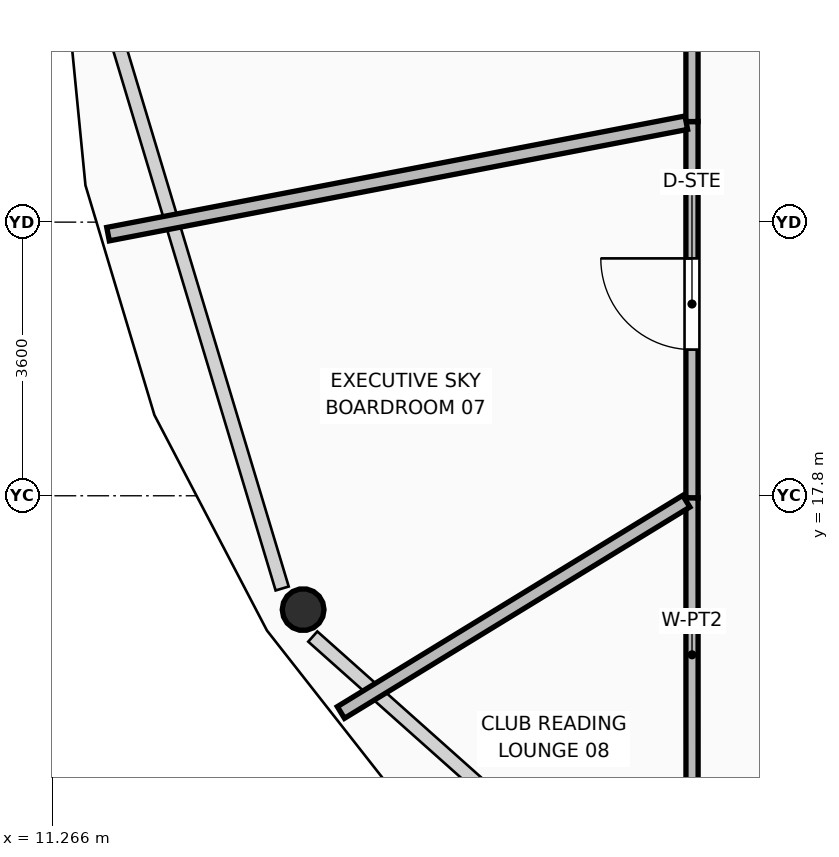
"""IFC4 building model, lengths in metres.
Left out: names, types, materials, properties, quantities, classifications, styles, units other than length and angle.
Written with IfcOpenShell. Run it as: python <this file> out.ifc"""

import sys

from ifc_helpers import new_model, si_unit, direction, frame, frame_2d, origin, origin_2d, place, context, subcontext, project, spatial, rectangle, hollow_circle, extrude, element, fill, save


model = new_model("IFC4")
c1 = context("Model", 3, precision=1e-05, world=origin(), true_north=direction((0.0, 1.0)))
c2 = subcontext(c1, "Body", "Model", "MODEL_VIEW")
j1 = project(units=[si_unit("LENGTHUNIT", "METRE"), si_unit("PLANEANGLEUNIT", "RADIAN")], contexts=[c1])
p1 = place(None, origin())
s1 = spatial("IfcSite", under=j1, at=p1, CompositionType="ELEMENT")
p2 = place(p1, origin())
s2 = spatial("IfcBuilding", under=s1, at=p2, CompositionType="ELEMENT")
p3 = place(p2, frame((0.0, 0.0, 278.85)))
s3 = spatial("IfcBuildingStorey", under=s2, at=p3, CompositionType="ELEMENT", Elevation=278.85)
p4 = place(p3, frame((14.569, 16.302, 0.0), z_axis=(0.185218066702, 0.09531807333, 0.978063767177), x_axis=(-0.457587432232, 0.889164631474, 0.0)))
e1 = element("IfcColumn", 1, at=p4, inside=s3, PredefinedType="COLUMN", context=c2, shape_type="SweptSolid", body=[
    extrude(hollow_circle(Radius=0.275, WallThickness=0.025, at=origin_2d()), origin(), (0.0, 0.0, 1.0), 3.65),
])
p5 = place(p3, frame((19.686, 13.642, 0.0), z_axis=(0.0, 0.0, 1.0), x_axis=(-0.000236350738, 0.999999972069, 0.0)))
e2 = element("IfcWall", 2, at=p5, inside=s3, PredefinedType="PARTITIONING", context=c2, shape_type="SweptSolid", body=[
    extrude(rectangle(XDim=4.132, YDim=0.16, at=frame_2d((2.066, 0.0))), origin(), (0.0, 0.0, 1.0), 3.132),
])
p6 = place(p3, frame((19.685, 17.774, 0.0), z_axis=(0.0, 0.0, 1.0), x_axis=(0.0, 1.0, 0.0)))
e3 = element("IfcWall", 3, at=p6, inside=s3, PredefinedType="PARTITIONING", context=c2, shape_type="SweptSolid", body=[
    extrude(rectangle(XDim=4.949, YDim=0.16, at=frame_2d((2.475, 0.0))), origin(), (0.0, 0.0, 1.0), 3.132),
])
p7 = place(p6, frame((1.949, 0.0, 0.0)))
e4 = element("IfcOpeningElement", 4, at=p7, cuts=e3, PredefinedType="OPENING", context=c2, shape_type="SweptSolid", body=[
    extrude(rectangle(XDim=1.2, YDim=2.1, at=frame_2d((0.6, 1.05))), frame((0.0, 0.09, 0.0), z_axis=(0.0, -1.0, 0.0), x_axis=(1.0, 0.0, 0.0)), (0.0, 0.0, 1.0), 0.18),
])
p8 = place(p3, frame((19.685, 22.723, 0.0), z_axis=(0.0, 0.0, 1.0), x_axis=(0.0, 1.0, 0.0)))
e5 = element("IfcWall", 5, at=p8, inside=s3, PredefinedType="PARTITIONING", context=c2, shape_type="SweptSolid", body=[
    extrude(rectangle(XDim=1.127, YDim=0.16, at=frame_2d((0.563, 0.0))), origin(), (0.0, 0.0, 1.0), 3.55),
])
p9 = place(p3, frame((19.61, 22.708, 0.0), z_axis=(0.0, 0.0, 1.0), x_axis=(-0.981935582375, -0.18921551751, 0.0)))
e6 = element("IfcWall", 6, at=p9, inside=s3, PredefinedType="PARTITIONING", context=c2, shape_type="SweptSolid", body=[
    extrude(rectangle(XDim=7.748, YDim=0.18, at=frame_2d((3.874, 0.0))), origin(), (0.0, 0.0, 1.0), 3.003),
])
p10 = place(p3, frame((19.61, 17.728, 0.0), z_axis=(0.0, 0.0, 1.0), x_axis=(-0.853110707967, -0.521729930091, 0.0)))
e7 = element("IfcWall", 7, at=p10, inside=s3, PredefinedType="PARTITIONING", context=c2, shape_type="SweptSolid", body=[
    extrude(rectangle(XDim=5.327, YDim=0.18, at=frame_2d((2.663, 0.0))), origin(), (0.0, 0.0, 1.0), 3.003),
])
p11 = place(p7, origin())
e8 = element("IfcDoor", 8, at=p11, inside=s3, OperationType="SINGLE_SWING_RIGHT", PredefinedType="DOOR", context=c2, shape_type="SweptSolid", body=[
    extrude(rectangle(XDim=1.2, YDim=2.1, at=frame_2d((0.6, 1.05))), frame((0.0, 0.025, 0.0), z_axis=(0.0, -1.0, 0.0), x_axis=(1.0, 0.0, 0.0)), (0.0, 0.0, 1.0), 0.05),
])
fill(e4, e8)
save(model, sys.argv[1])
